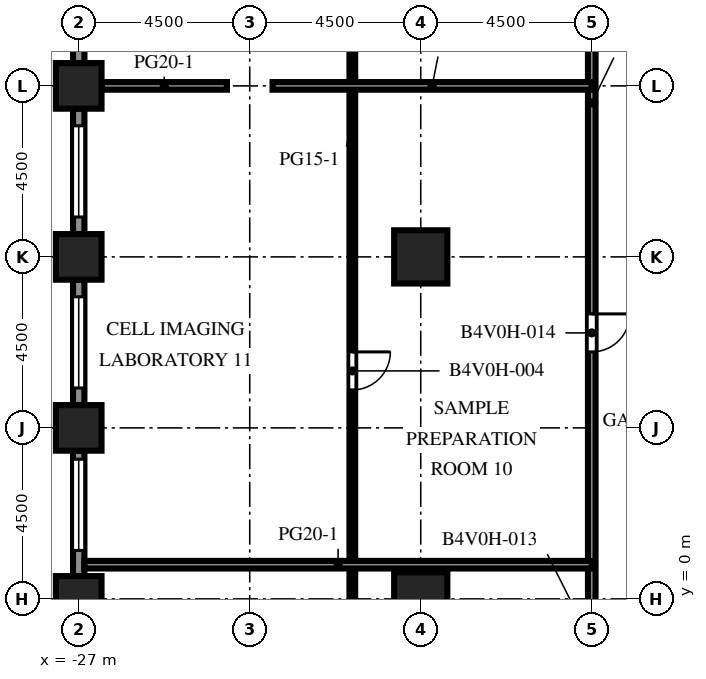
"""IFC4 building model, lengths in metres.
Left out: names, types, materials, properties, quantities, classifications, styles, units other than length and angle.
Written with IfcOpenShell. Run it as: python <this file> out.ifc"""

import sys

from ifc_helpers import new_model, si_unit, direction, frame, frame_2d, origin, origin_2d, place, context, subcontext, project, spatial, rectangle, extrude, element, fill, save


model = new_model("IFC4")
c1 = context("Model", 3, precision=1e-05, world=origin(), true_north=direction((0.0, 1.0)))
c2 = subcontext(c1, "Body", "Model", "MODEL_VIEW")
j1 = project(units=[si_unit("LENGTHUNIT", "METRE"), si_unit("PLANEANGLEUNIT", "RADIAN")], contexts=[c1])
p1 = place(None, origin())
s1 = spatial("IfcSite", under=j1, at=p1, CompositionType="ELEMENT")
p2 = place(p1, origin())
s2 = spatial("IfcBuilding", under=s1, at=p2, CompositionType="ELEMENT")
p3 = place(p2, frame((0.0, 0.0, 116.7)))
s3 = spatial("IfcBuildingStorey", under=s2, at=p3, CompositionType="ELEMENT", Elevation=116.7)
for number, where, z_axis, x_axis in (
    (1, (-27.0, 0.0, -0.45), (0.0, 0.0, 1.0), (1.0, 0.0, 0.0)),
    (2, (-27.0, 4.5, -0.45), (0.0, 0.0, 1.0), (1.0, 0.0, 0.0)),
    (3, (-27.0, 9.0, -0.45), (0.0, 0.0, 1.0), (1.0, 0.0, 0.0)),
    (4, (-27.0, 13.5, -0.45), (0.0, 0.0, 1.0), (1.0, 0.0, 0.0)),
):
    element("IfcColumn", number, at=place(p3, frame(where, z_axis=z_axis, x_axis=x_axis)), inside=s3, PredefinedType="COLUMN", context=c2, shape_type="SweptSolid", body=[
        extrude(rectangle(XDim=1.2, YDim=1.2, at=origin_2d()), origin(), (0.0, 0.0, 1.0), 4.55),
    ])
for number, where, z_axis, x_axis in (
    (5, (-18.0, 0.0, -0.45), (0.0, 0.0, 1.0), (1.0, 0.0, 0.0)),
    (6, (-18.0, 9.0, -0.45), (0.0, 0.0, 1.0), (1.0, 0.0, 0.0)),
):
    element("IfcColumn", number, at=place(p3, frame(where, z_axis=z_axis, x_axis=x_axis)), inside=s3, PredefinedType="COLUMN", context=c2, shape_type="SweptSolid", body=[
        extrude(rectangle(XDim=1.4, YDim=1.4, at=origin_2d()), origin(), (0.0, 0.0, 1.0), 4.55),
    ])
p4 = place(p3, frame((-27.0, 14.1, 0.0), z_axis=(0.0, 0.0, 1.0), x_axis=(0.0, 1.0, 0.0)))
e7 = element("IfcWall", 7, at=p4, inside=s3, PredefinedType="SOLIDWALL", context=c2, shape_type="SweptSolid", body=[
    extrude(rectangle(XDim=3.3, YDim=0.3, at=frame_2d((1.65, 0.0))), origin(), (0.0, 0.0, 1.0), 2.75),
])
p5 = place(p4, frame((0.45, 0.0, 0.8)))
e8 = element("IfcOpeningElement", 8, at=p5, cuts=e7, PredefinedType="OPENING", context=c2, shape_type="SweptSolid", body=[
    extrude(rectangle(XDim=2.4, YDim=1.7, at=frame_2d((1.2, 0.85))), frame((0.0, 0.16, 0.0), z_axis=(0.0, -1.0, 0.0), x_axis=(1.0, 0.0, 0.0)), (0.0, 0.0, 1.0), 0.32),
])
p6 = place(p3, frame((-27.0, 9.6, 0.0), z_axis=(0.0, 0.0, 1.0), x_axis=(0.0, 1.0, 0.0)))
e9 = element("IfcWall", 9, at=p6, inside=s3, PredefinedType="SOLIDWALL", context=c2, shape_type="SweptSolid", body=[
    extrude(rectangle(XDim=3.3, YDim=0.3, at=frame_2d((1.65, 0.0))), origin(), (0.0, 0.0, 1.0), 2.75),
])
p7 = place(p6, frame((0.45, 0.0, 0.8)))
e10 = element("IfcOpeningElement", 10, at=p7, cuts=e9, PredefinedType="OPENING", context=c2, shape_type="SweptSolid", body=[
    extrude(rectangle(XDim=2.4, YDim=1.7, at=frame_2d((1.2, 0.85))), frame((0.0, 0.16, 0.0), z_axis=(0.0, -1.0, 0.0), x_axis=(1.0, 0.0, 0.0)), (0.0, 0.0, 1.0), 0.32),
])
p8 = place(p3, frame((-27.0, 5.1, 0.0), z_axis=(0.0, 0.0, 1.0), x_axis=(0.0, 1.0, 0.0)))
e11 = element("IfcWall", 11, at=p8, inside=s3, PredefinedType="SOLIDWALL", context=c2, shape_type="SweptSolid", body=[
    extrude(rectangle(XDim=3.3, YDim=0.3, at=frame_2d((1.65, 0.0))), origin(), (0.0, 0.0, 1.0), 2.75),
])
p9 = place(p8, frame((0.45, 0.0, 0.8)))
e12 = element("IfcOpeningElement", 12, at=p9, cuts=e11, PredefinedType="OPENING", context=c2, shape_type="SweptSolid", body=[
    extrude(rectangle(XDim=2.4, YDim=1.7, at=frame_2d((1.2, 0.85))), frame((0.0, 0.16, 0.0), z_axis=(0.0, -1.0, 0.0), x_axis=(1.0, 0.0, 0.0)), (0.0, 0.0, 1.0), 0.32),
])
p10 = place(p3, frame((-27.0, 0.6, 0.0), z_axis=(0.0, 0.0, 1.0), x_axis=(0.0, 1.0, 0.0)))
e13 = element("IfcWall", 13, at=p10, inside=s3, PredefinedType="SOLIDWALL", context=c2, shape_type="SweptSolid", body=[
    extrude(rectangle(XDim=3.3, YDim=0.3, at=frame_2d((1.65, 0.0))), origin(), (0.0, 0.0, 1.0), 2.75),
])
p11 = place(p10, frame((0.675, 0.0, 0.8)))
e14 = element("IfcOpeningElement", 14, at=p11, cuts=e13, PredefinedType="OPENING", context=c2, shape_type="SweptSolid", body=[
    extrude(rectangle(XDim=2.4, YDim=1.7, at=frame_2d((1.2, 0.85))), frame((0.0, 0.16, 0.0), z_axis=(0.0, -1.0, 0.0), x_axis=(1.0, 0.0, 0.0)), (0.0, 0.0, 1.0), 0.32),
])
p12 = place(p3, frame((-19.8, -22.35, 0.0), z_axis=(0.0, 0.0, 1.0), x_axis=(0.0, 1.0, 0.0)))
e15 = element("IfcWall", 15, at=p12, inside=s3, PredefinedType="PARTITIONING", context=c2, shape_type="SweptSolid", body=[
    extrude(rectangle(XDim=53.7, YDim=0.15, at=frame_2d((26.85, 0.0))), origin(), (0.0, 0.0, 1.0), 3.65),
])
p13 = place(p12, frame((5.2, 0.0, 0.0)))
e16 = element("IfcOpeningElement", 16, at=p13, cuts=e15, PredefinedType="OPENING", context=c2, shape_type="SweptSolid", body=[
    extrude(rectangle(XDim=1.0, YDim=2.1, at=frame_2d((0.5, 1.05))), frame((0.0, 0.085, 0.0), z_axis=(0.0, -1.0, 0.0), x_axis=(1.0, 0.0, 0.0)), (0.0, 0.0, 1.0), 0.17),
])
p14 = place(p12, frame((11.45, 0.0, 0.0)))
e17 = element("IfcOpeningElement", 17, at=p14, cuts=e15, PredefinedType="OPENING", context=c2, shape_type="SweptSolid", body=[
    extrude(rectangle(XDim=1.0, YDim=2.1, at=frame_2d((0.5, 1.05))), frame((0.0, 0.085, 0.0), z_axis=(0.0, -1.0, 0.0), x_axis=(1.0, 0.0, 0.0)), (0.0, 0.0, 1.0), 0.17),
])
p15 = place(p12, frame((20.45, 0.0, 0.0)))
e18 = element("IfcOpeningElement", 18, at=p15, cuts=e15, PredefinedType="OPENING", context=c2, shape_type="SweptSolid", body=[
    extrude(rectangle(XDim=1.0, YDim=2.1, at=frame_2d((0.5, 1.05))), frame((0.0, 0.085, 0.0), z_axis=(0.0, -1.0, 0.0), x_axis=(1.0, 0.0, 0.0)), (0.0, 0.0, 1.0), 0.17),
])
p16 = place(p12, frame((27.85, 0.0, 0.0)))
e19 = element("IfcOpeningElement", 19, at=p16, cuts=e15, PredefinedType="OPENING", context=c2, shape_type="SweptSolid", body=[
    extrude(rectangle(XDim=1.0, YDim=2.1, at=frame_2d((0.5, 1.05))), frame((0.0, 0.085, 0.0), z_axis=(0.0, -1.0, 0.0), x_axis=(1.0, 0.0, 0.0)), (0.0, 0.0, 1.0), 0.17),
])
p17 = place(p12, frame((41.2, 0.0, 0.0)))
e20 = element("IfcOpeningElement", 20, at=p17, cuts=e15, PredefinedType="OPENING", context=c2, shape_type="SweptSolid", body=[
    extrude(rectangle(XDim=1.0, YDim=2.1, at=frame_2d((0.5, 1.05))), frame((0.0, 0.085, 0.0), z_axis=(0.0, -1.0, 0.0), x_axis=(1.0, 0.0, 0.0)), (0.0, 0.0, 1.0), 0.17),
])
p18 = place(p12, frame((50.2, 0.0, 0.0)))
e21 = element("IfcOpeningElement", 21, at=p18, cuts=e15, PredefinedType="OPENING", context=c2, shape_type="SweptSolid", body=[
    extrude(rectangle(XDim=1.0, YDim=2.1, at=frame_2d((0.5, 1.05))), frame((0.0, 0.085, 0.0), z_axis=(0.0, -1.0, 0.0), x_axis=(1.0, 0.0, 0.0)), (0.0, 0.0, 1.0), 0.17),
])
p19 = place(p3, frame((-13.5, -21.9, 0.0), z_axis=(0.0, 0.0, 1.0), x_axis=(0.0, 1.0, 0.0)))
e22 = element("IfcWall", 22, at=p19, inside=s3, PredefinedType="PARTITIONING", context=c2, shape_type="SweptSolid", body=[
    extrude(rectangle(XDim=52.8, YDim=0.2, at=frame_2d((26.4, 0.0))), origin(), (0.0, 0.0, 1.0), 3.65),
])
p20 = place(p19, frame((2.25, 0.0, 0.0)))
e23 = element("IfcOpeningElement", 23, at=p20, cuts=e22, PredefinedType="OPENING", context=c2, shape_type="SweptSolid", body=[
    extrude(rectangle(XDim=1.0, YDim=2.1, at=frame_2d((0.5, 1.05))), frame((0.0, 0.11, 0.0), z_axis=(0.0, -1.0, 0.0), x_axis=(1.0, 0.0, 0.0)), (0.0, 0.0, 1.0), 0.22),
])
p21 = place(p19, frame((13.5, 0.0, 0.0)))
e24 = element("IfcOpeningElement", 24, at=p21, cuts=e22, PredefinedType="OPENING", context=c2, shape_type="SweptSolid", body=[
    extrude(rectangle(XDim=1.0, YDim=2.1, at=frame_2d((0.5, 1.05))), frame((0.0, 0.11, 0.0), z_axis=(0.0, -1.0, 0.0), x_axis=(1.0, 0.0, 0.0)), (0.0, 0.0, 1.0), 0.22),
])
p22 = place(p19, frame((20.25, 0.0, 0.0)))
e25 = element("IfcOpeningElement", 25, at=p22, cuts=e22, PredefinedType="OPENING", context=c2, shape_type="SweptSolid", body=[
    extrude(rectangle(XDim=1.0, YDim=2.1, at=frame_2d((0.5, 1.05))), frame((0.0, 0.11, 0.0), z_axis=(0.0, -1.0, 0.0), x_axis=(1.0, 0.0, 0.0)), (0.0, 0.0, 1.0), 0.22),
])
p23 = place(p19, frame((28.4, 0.0, 0.0)))
e26 = element("IfcOpeningElement", 26, at=p23, cuts=e22, PredefinedType="OPENING", context=c2, shape_type="SweptSolid", body=[
    extrude(rectangle(XDim=1.0, YDim=2.1, at=frame_2d((0.5, 1.05))), frame((0.0, 0.11, 0.0), z_axis=(0.0, -1.0, 0.0), x_axis=(1.0, 0.0, 0.0)), (0.0, 0.0, 1.0), 0.22),
])
p24 = place(p19, frame((40.5, 0.0, 0.0)))
e27 = element("IfcOpeningElement", 27, at=p24, cuts=e22, PredefinedType="OPENING", context=c2, shape_type="SweptSolid", body=[
    extrude(rectangle(XDim=1.0, YDim=2.1, at=frame_2d((0.5, 1.05))), frame((0.0, 0.11, 0.0), z_axis=(0.0, -1.0, 0.0), x_axis=(1.0, 0.0, 0.0)), (0.0, 0.0, 1.0), 0.22),
])
p25 = place(p19, frame((49.5, 0.0, 0.0)))
e28 = element("IfcOpeningElement", 28, at=p25, cuts=e22, PredefinedType="OPENING", context=c2, shape_type="SweptSolid", body=[
    extrude(rectangle(XDim=1.0, YDim=2.1, at=frame_2d((0.5, 1.05))), frame((0.0, 0.11, 0.0), z_axis=(0.0, -1.0, 0.0), x_axis=(1.0, 0.0, 0.0)), (0.0, 0.0, 1.0), 0.22),
])
p26 = place(p3, frame((-26.85, 0.9, 0.0), z_axis=(0.0, 0.0, 1.0), x_axis=(1.0, 0.0, 0.0)))
e29 = element("IfcWall", 29, at=p26, inside=s3, PredefinedType="PARTITIONING", context=c2, shape_type="SweptSolid", body=[
    extrude(rectangle(XDim=13.35, YDim=0.2, at=frame_2d((6.675, 0.0))), origin(), (0.0, 0.0, 1.0), 3.65),
])
p27 = place(p3, frame((-26.4, 13.5, 0.0), z_axis=(0.0, 0.0, 1.0), x_axis=(1.0, 0.0, 0.0)))
e30 = element("IfcWall", 30, at=p27, inside=s3, PredefinedType="PARTITIONING", context=c2, shape_type="SweptSolid", body=[
    extrude(rectangle(XDim=3.3, YDim=0.2, at=frame_2d((1.65, 0.0))), origin(), (0.0, 0.0, 1.0), 3.65),
])
p28 = place(p3, frame((-21.9, 13.5, 0.0), z_axis=(0.0, 0.0, 1.0), x_axis=(1.0, 0.0, 0.0)))
e31 = element("IfcWall", 31, at=p28, inside=s3, PredefinedType="PARTITIONING", context=c2, shape_type="SweptSolid", body=[
    extrude(rectangle(XDim=8.4, YDim=0.2, at=frame_2d((4.2, 0.0))), origin(), (0.0, 0.0, 1.0), 3.65),
])
p29 = place(p7, origin())
e32 = element("IfcWindow", 32, at=p29, inside=s3, PartitioningType="SINGLE_PANEL", PredefinedType="WINDOW", context=c2, shape_type="SweptSolid", body=[
    extrude(rectangle(XDim=2.4, YDim=1.7, at=frame_2d((1.2, 0.85))), frame((0.0, 0.03, 0.0), z_axis=(0.0, -1.0, 0.0), x_axis=(1.0, 0.0, 0.0)), (0.0, 0.0, 1.0), 0.06),
])
fill(e10, e32)
p30 = place(p9, origin())
e33 = element("IfcWindow", 33, at=p30, inside=s3, PartitioningType="SINGLE_PANEL", PredefinedType="WINDOW", context=c2, shape_type="SweptSolid", body=[
    extrude(rectangle(XDim=2.4, YDim=1.7, at=frame_2d((1.2, 0.85))), frame((0.0, 0.03, 0.0), z_axis=(0.0, -1.0, 0.0), x_axis=(1.0, 0.0, 0.0)), (0.0, 0.0, 1.0), 0.06),
])
fill(e12, e33)
p31 = place(p11, origin())
e34 = element("IfcWindow", 34, at=p31, inside=s3, PartitioningType="SINGLE_PANEL", PredefinedType="WINDOW", context=c2, shape_type="SweptSolid", body=[
    extrude(rectangle(XDim=2.4, YDim=1.7, at=frame_2d((1.2, 0.85))), frame((0.0, 0.03, 0.0), z_axis=(0.0, -1.0, 0.0), x_axis=(1.0, 0.0, 0.0)), (0.0, 0.0, 1.0), 0.06),
])
fill(e14, e34)
p32 = place(p16, origin())
e35 = element("IfcDoor", 35, at=p32, inside=s3, OperationType="SINGLE_SWING_RIGHT", PredefinedType="DOOR", context=c2, shape_type="SweptSolid", body=[
    extrude(rectangle(XDim=1.0, YDim=2.1, at=frame_2d((0.5, 1.05))), frame((0.0, 0.025, 0.0), z_axis=(0.0, -1.0, 0.0), x_axis=(1.0, 0.0, 0.0)), (0.0, 0.0, 1.0), 0.05),
])
fill(e19, e35)
p33 = place(p23, origin())
e36 = element("IfcDoor", 36, at=p33, inside=s3, OperationType="SINGLE_SWING_RIGHT", PredefinedType="DOOR", context=c2, shape_type="SweptSolid", body=[
    extrude(rectangle(XDim=1.0, YDim=2.1, at=frame_2d((0.5, 1.05))), frame((0.0, 0.025, 0.0), z_axis=(0.0, -1.0, 0.0), x_axis=(1.0, 0.0, 0.0)), (0.0, 0.0, 1.0), 0.05),
])
fill(e26, e36)
save(model, sys.argv[1])
